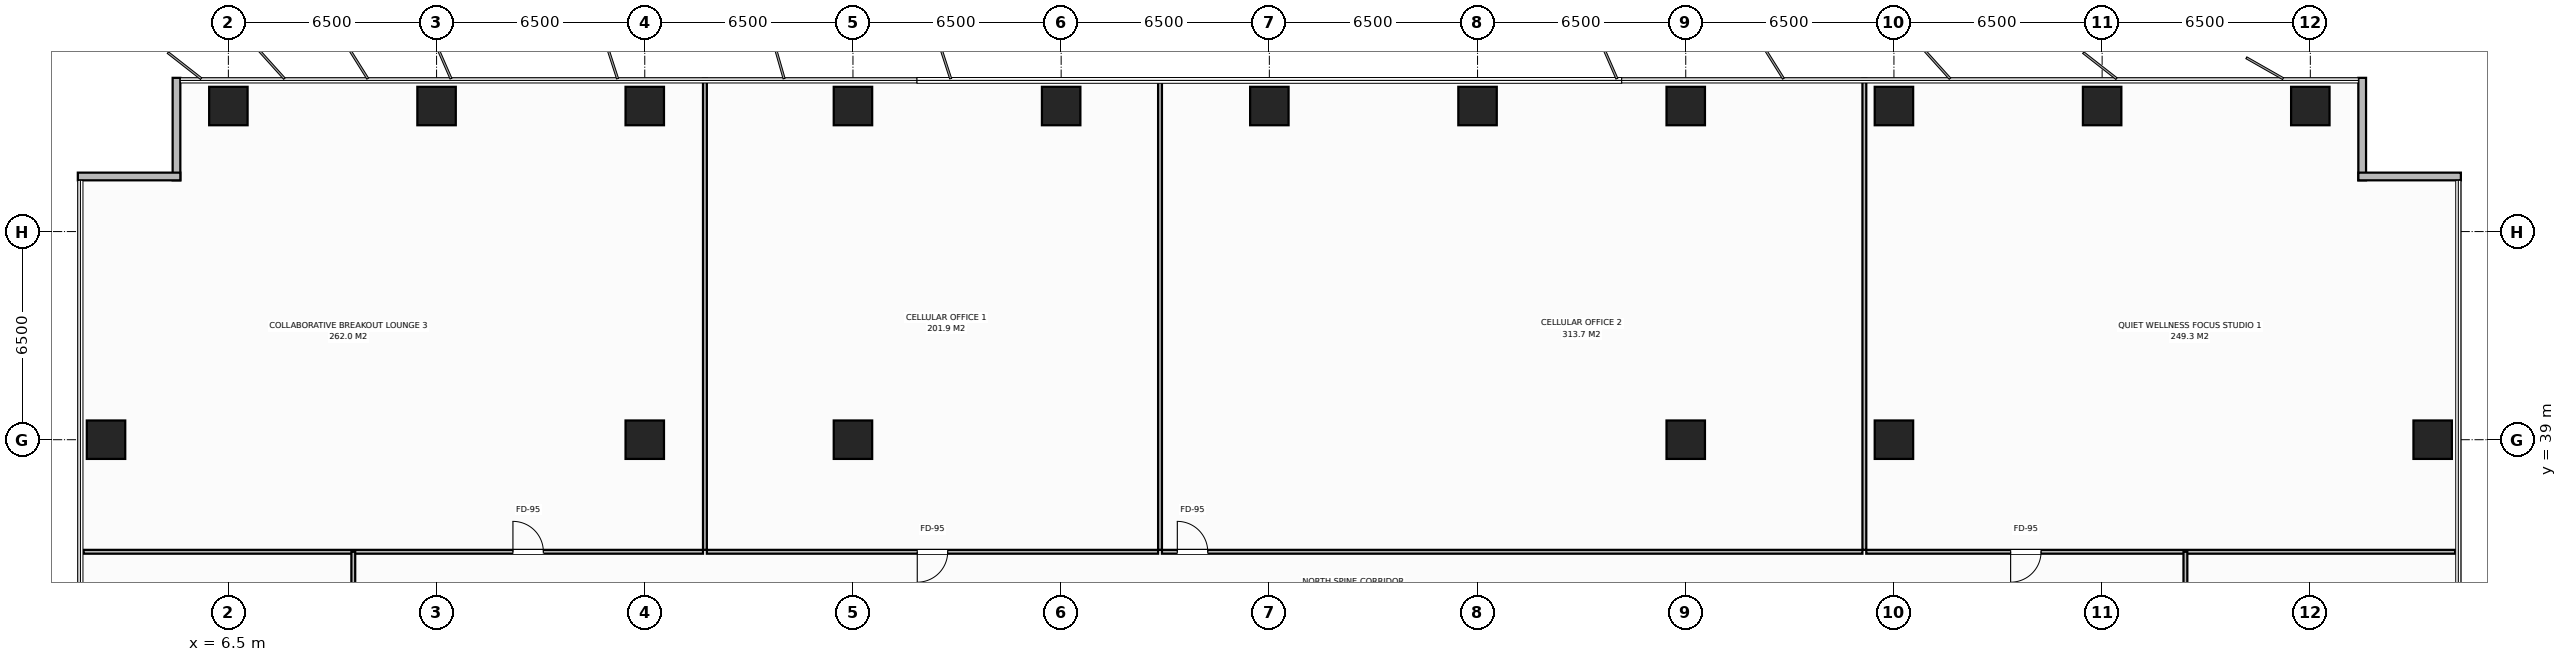
"""IFC4 building model, lengths in metres.
Left out: names, types, materials, properties, quantities, classifications, styles, units other than length and angle.
Written with IfcOpenShell. Run it as: python <this file> out.ifc"""

import sys

from ifc_helpers import new_model, si_unit, direction, frame, frame_2d, origin, origin_2d, place, context, subcontext, project, spatial, rectangle, extrude, element, fill, save


model = new_model("IFC4")
c1 = context("Model", 3, precision=1e-05, world=origin(), true_north=direction((0.0, 1.0)))
c2 = subcontext(c1, "Body", "Model", "MODEL_VIEW")
j1 = project(units=[si_unit("LENGTHUNIT", "METRE"), si_unit("PLANEANGLEUNIT", "RADIAN")], contexts=[c1])
p1 = place(None, origin())
s1 = spatial("IfcSite", under=j1, at=p1, CompositionType="ELEMENT")
p2 = place(p1, origin())
s2 = spatial("IfcBuilding", under=s1, at=p2, CompositionType="ELEMENT")
p3 = place(p2, frame((0.0, 0.0, 97.4)))
s3 = spatial("IfcBuildingStorey", under=s2, at=p3, CompositionType="ELEMENT", Elevation=97.4)
for number, where, z_axis, x_axis in (
    (1, (19.5, 39.0, 0.0), (0.0, 0.0, 1.0), (1.0, 0.0, 0.0)),
    (2, (58.5, 39.0, 0.0), (0.0, 0.0, 1.0), (1.0, 0.0, 0.0)),
    (3, (26.0, 39.0, 0.0), (0.0, 0.0, 1.0), (1.0, 0.0, 0.0)),
    (4, (52.0, 39.0, 0.0), (0.0, 0.0, 1.0), (1.0, 0.0, 0.0)),
    (5, (6.5, 49.42, 0.0), (0.0, 0.0, 1.0), (1.0, 0.0, 0.0)),
    (6, (13.0, 49.42, 0.0), (0.0, 0.0, 1.0), (1.0, 0.0, 0.0)),
    (7, (19.5, 49.42, 0.0), (0.0, 0.0, 1.0), (1.0, 0.0, 0.0)),
    (8, (26.0, 49.42, 0.0), (0.0, 0.0, 1.0), (1.0, 0.0, 0.0)),
    (9, (32.5, 49.42, 0.0), (0.0, 0.0, 1.0), (1.0, 0.0, 0.0)),
    (10, (39.0, 49.42, 0.0), (0.0, 0.0, 1.0), (1.0, 0.0, 0.0)),
    (11, (45.5, 49.42, 0.0), (0.0, 0.0, 1.0), (1.0, 0.0, 0.0)),
    (12, (52.0, 49.42, 0.0), (0.0, 0.0, 1.0), (1.0, 0.0, 0.0)),
    (13, (58.5, 49.42, 0.0), (0.0, 0.0, 1.0), (1.0, 0.0, 0.0)),
    (14, (65.0, 49.42, 0.0), (0.0, 0.0, 1.0), (1.0, 0.0, 0.0)),
    (15, (71.5, 49.42, 0.0), (0.0, 0.0, 1.0), (1.0, 0.0, 0.0)),
    (16, (2.68, 39.0, 0.0), (0.0, 0.0, 1.0), (1.0, 0.0, 0.0)),
    (17, (75.32, 39.0, 0.0), (0.0, 0.0, 1.0), (1.0, 0.0, 0.0)),
):
    element("IfcColumn", number, at=place(p3, frame(where, z_axis=z_axis, x_axis=x_axis)), inside=s3, PredefinedType="COLUMN", context=c2, shape_type="SweptSolid", body=[
        extrude(rectangle(XDim=1.2, YDim=1.2, at=origin_2d()), origin(), (0.0, 0.0, 1.0), 3.8),
    ])
for number, where, z_axis, x_axis in (
    (18, (4.88, 47.1, 0.0), (0.0, 0.0, 1.0), (0.0, 1.0, 0.0)),
    (19, (1.8, 47.22, 0.0), (0.0, 0.0, 1.0), (1.0, 0.0, 0.0)),
    (20, (73.12, 50.3, 0.0), (0.0, 0.0, 1.0), (0.0, -1.0, 0.0)),
    (21, (73.0, 47.22, 0.0), (0.0, 0.0, 1.0), (1.0, 0.0, 0.0)),
):
    element("IfcWall", number, at=place(p3, frame(where, z_axis=z_axis, x_axis=x_axis)), inside=s3, PredefinedType="STANDARD", context=c2, shape_type="SweptSolid", body=[
        extrude(rectangle(XDim=3.2, YDim=0.24, at=frame_2d((1.6, 0.0))), origin(), (0.0, 0.0, 1.0), 3.565),
    ])
p4 = place(p3, frame((21.378, 35.56, 0.0), z_axis=(0.0, 0.0, 1.0), x_axis=(0.0, 1.0, 0.0)))
e22 = element("IfcWall", 22, at=p4, inside=s3, PredefinedType="PARTITIONING", context=c2, shape_type="SweptSolid", body=[
    extrude(rectangle(XDim=14.72, YDim=0.12, at=frame_2d((7.36, 0.0))), origin(), (0.0, 0.0, 1.0), 3.565),
])
p5 = place(p3, frame((1.98, 35.5, 0.0), z_axis=(0.0, 0.0, 1.0), x_axis=(1.0, 0.0, 0.0)))
e23 = element("IfcWall", 23, at=p5, inside=s3, PredefinedType="PARTITIONING", context=c2, shape_type="SweptSolid", body=[
    extrude(rectangle(XDim=19.339, YDim=0.12, at=frame_2d((9.669, 0.0))), origin(), (0.0, 0.0, 1.0), 3.565),
])
p6 = place(p5, frame((13.404, 0.0, 0.0)))
e24 = element("IfcOpeningElement", 24, at=p6, cuts=e23, PredefinedType="OPENING", context=c2, shape_type="SweptSolid", body=[
    extrude(rectangle(XDim=0.95, YDim=2.15, at=frame_2d((0.475, 1.075))), frame((0.0, 0.07, 0.0), z_axis=(0.0, -1.0, 0.0), x_axis=(1.0, 0.0, 0.0)), (0.0, 0.0, 1.0), 0.14),
])
p7 = place(p3, frame((35.587, 35.56, 0.0), z_axis=(0.0, 0.0, 1.0), x_axis=(0.0, 1.0, 0.0)))
e25 = element("IfcWall", 25, at=p7, inside=s3, PredefinedType="PARTITIONING", context=c2, shape_type="SweptSolid", body=[
    extrude(rectangle(XDim=14.72, YDim=0.12, at=frame_2d((7.36, 0.0))), origin(), (0.0, 0.0, 1.0), 3.565),
])
p8 = place(p3, frame((21.438, 35.5, 0.0), z_axis=(0.0, 0.0, 1.0), x_axis=(1.0, 0.0, 0.0)))
e26 = element("IfcWall", 26, at=p8, inside=s3, PredefinedType="PARTITIONING", context=c2, shape_type="SweptSolid", body=[
    extrude(rectangle(XDim=14.088, YDim=0.12, at=frame_2d((7.044, 0.0))), origin(), (0.0, 0.0, 1.0), 3.565),
])
p9 = place(p8, frame((6.569, 0.0, 0.0)))
e27 = element("IfcOpeningElement", 27, at=p9, cuts=e26, PredefinedType="OPENING", context=c2, shape_type="SweptSolid", body=[
    extrude(rectangle(XDim=0.95, YDim=2.15, at=frame_2d((0.475, 1.075))), frame((0.0, 0.07, 0.0), z_axis=(0.0, -1.0, 0.0), x_axis=(1.0, 0.0, 0.0)), (0.0, 0.0, 1.0), 0.14),
])
p10 = place(p3, frame((57.577, 35.56, 0.0), z_axis=(0.0, 0.0, 1.0), x_axis=(0.0, 1.0, 0.0)))
e28 = element("IfcWall", 28, at=p10, inside=s3, PredefinedType="PARTITIONING", context=c2, shape_type="SweptSolid", body=[
    extrude(rectangle(XDim=14.72, YDim=0.12, at=frame_2d((7.36, 0.0))), origin(), (0.0, 0.0, 1.0), 3.565),
])
p11 = place(p3, frame((35.647, 35.5, 0.0), z_axis=(0.0, 0.0, 1.0), x_axis=(1.0, 0.0, 0.0)))
e29 = element("IfcWall", 29, at=p11, inside=s3, PredefinedType="PARTITIONING", context=c2, shape_type="SweptSolid", body=[
    extrude(rectangle(XDim=21.87, YDim=0.12, at=frame_2d((10.935, 0.0))), origin(), (0.0, 0.0, 1.0), 3.565),
])
p12 = place(p11, frame((0.48, 0.0, 0.0)))
e30 = element("IfcOpeningElement", 30, at=p12, cuts=e29, PredefinedType="OPENING", context=c2, shape_type="SweptSolid", body=[
    extrude(rectangle(XDim=0.95, YDim=2.15, at=frame_2d((0.475, 1.075))), frame((0.0, 0.07, 0.0), z_axis=(0.0, -1.0, 0.0), x_axis=(1.0, 0.0, 0.0)), (0.0, 0.0, 1.0), 0.14),
])
p13 = place(p3, frame((57.637, 35.5, 0.0), z_axis=(0.0, 0.0, 1.0), x_axis=(1.0, 0.0, 0.0)))
e31 = element("IfcWall", 31, at=p13, inside=s3, PredefinedType="PARTITIONING", context=c2, shape_type="SweptSolid", body=[
    extrude(rectangle(XDim=18.383, YDim=0.12, at=frame_2d((9.192, 0.0))), origin(), (0.0, 0.0, 1.0), 3.565),
])
p14 = place(p13, frame((4.507, 0.0, 0.0)))
e32 = element("IfcOpeningElement", 32, at=p14, cuts=e31, PredefinedType="OPENING", context=c2, shape_type="SweptSolid", body=[
    extrude(rectangle(XDim=0.95, YDim=2.15, at=frame_2d((0.475, 1.075))), frame((0.0, 0.07, 0.0), z_axis=(0.0, -1.0, 0.0), x_axis=(1.0, 0.0, 0.0)), (0.0, 0.0, 1.0), 0.14),
])
p15 = place(p3, frame((10.4, 18.6, 0.0), z_axis=(0.0, 0.0, 1.0), x_axis=(0.0, 1.0, 0.0)))
e33 = element("IfcWall", 33, at=p15, inside=s3, PredefinedType="PARTITIONING", context=c2, shape_type="SweptSolid", body=[
    extrude(rectangle(XDim=16.9, YDim=0.12, at=frame_2d((8.45, 0.0))), origin(), (0.0, 0.0, 1.0), 3.565),
])
p16 = place(p15, frame((6.925, 0.0, 0.0)))
e34 = element("IfcOpeningElement", 34, at=p16, cuts=e33, PredefinedType="OPENING", context=c2, shape_type="SweptSolid", body=[
    extrude(rectangle(XDim=0.95, YDim=2.15, at=frame_2d((0.475, 1.075))), frame((0.0, 0.07, 0.0), z_axis=(0.0, -1.0, 0.0), x_axis=(1.0, 0.0, 0.0)), (0.0, 0.0, 1.0), 0.14),
])
p17 = place(p3, frame((67.6, 26.0, 0.0), z_axis=(0.0, 0.0, 1.0), x_axis=(0.0, 1.0, 0.0)))
e35 = element("IfcWall", 35, at=p17, inside=s3, PredefinedType="PARTITIONING", context=c2, shape_type="SweptSolid", body=[
    extrude(rectangle(XDim=9.5, YDim=0.12, at=frame_2d((4.75, 0.0))), origin(), (0.0, 0.0, 1.0), 3.565),
])
p18 = place(p17, frame((3.225, 0.0, 0.0)))
e36 = element("IfcOpeningElement", 36, at=p18, cuts=e35, PredefinedType="OPENING", context=c2, shape_type="SweptSolid", body=[
    extrude(rectangle(XDim=0.95, YDim=2.15, at=frame_2d((0.475, 1.075))), frame((0.0, 0.07, 0.0), z_axis=(0.0, -1.0, 0.0), x_axis=(1.0, 0.0, 0.0)), (0.0, 0.0, 1.0), 0.14),
])
p19 = place(p6, origin())
e37 = element("IfcDoor", 37, at=p19, inside=s3, OperationType="SINGLE_SWING_LEFT", PredefinedType="DOOR", context=c2, shape_type="SweptSolid", body=[
    extrude(rectangle(XDim=0.95, YDim=2.15, at=frame_2d((0.475, 1.075))), frame((0.0, 0.025, 0.0), z_axis=(0.0, -1.0, 0.0), x_axis=(1.0, 0.0, 0.0)), (0.0, 0.0, 1.0), 0.05),
])
fill(e24, e37)
p20 = place(p9, origin())
e38 = element("IfcDoor", 38, at=p20, inside=s3, OperationType="SINGLE_SWING_RIGHT", PredefinedType="DOOR", context=c2, shape_type="SweptSolid", body=[
    extrude(rectangle(XDim=0.95, YDim=2.15, at=frame_2d((0.475, 1.075))), frame((0.0, 0.025, 0.0), z_axis=(0.0, -1.0, 0.0), x_axis=(1.0, 0.0, 0.0)), (0.0, 0.0, 1.0), 0.05),
])
fill(e27, e38)
p21 = place(p12, origin())
e39 = element("IfcDoor", 39, at=p21, inside=s3, OperationType="SINGLE_SWING_LEFT", PredefinedType="DOOR", context=c2, shape_type="SweptSolid", body=[
    extrude(rectangle(XDim=0.95, YDim=2.15, at=frame_2d((0.475, 1.075))), frame((0.0, 0.025, 0.0), z_axis=(0.0, -1.0, 0.0), x_axis=(1.0, 0.0, 0.0)), (0.0, 0.0, 1.0), 0.05),
])
fill(e30, e39)
p22 = place(p14, origin())
e40 = element("IfcDoor", 40, at=p22, inside=s3, OperationType="SINGLE_SWING_RIGHT", PredefinedType="DOOR", context=c2, shape_type="SweptSolid", body=[
    extrude(rectangle(XDim=0.95, YDim=2.15, at=frame_2d((0.475, 1.075))), frame((0.0, 0.025, 0.0), z_axis=(0.0, -1.0, 0.0), x_axis=(1.0, 0.0, 0.0)), (0.0, 0.0, 1.0), 0.05),
])
fill(e32, e40)
save(model, sys.argv[1])
